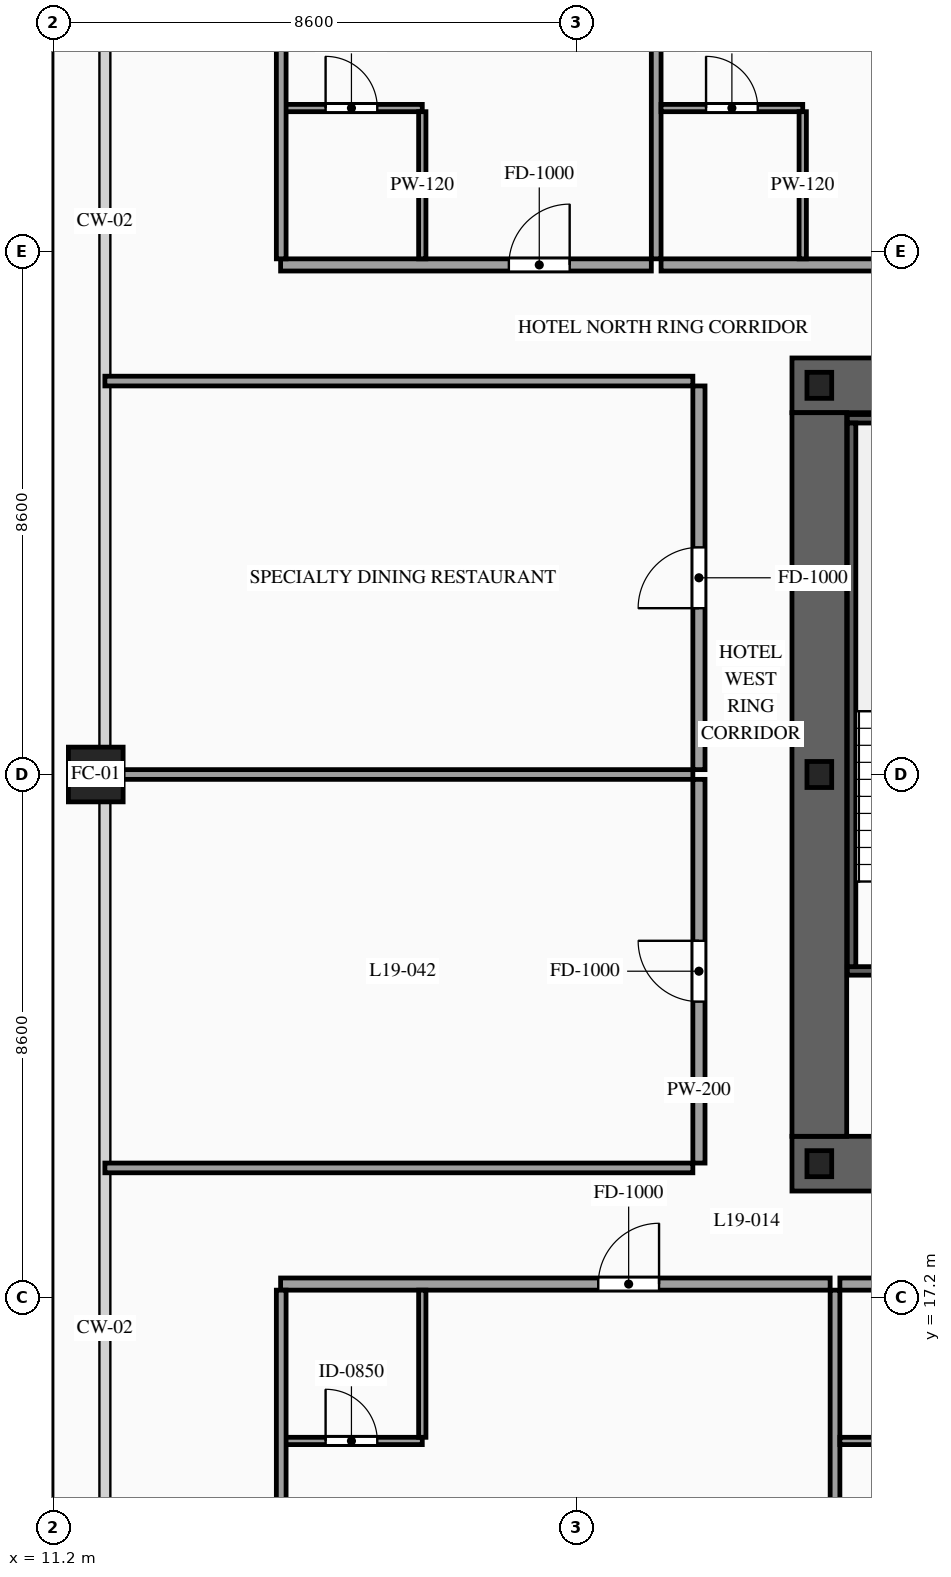
"""IFC4 building model, lengths in metres.
Left out: names, types, materials, properties, quantities, classifications, styles, units other than length and angle.
Written with IfcOpenShell. Run it as: python <this file> out.ifc"""

import sys

from ifc_helpers import new_model, si_unit, direction, frame, frame_2d, origin, origin_2d, place, context, subcontext, project, spatial, rectangle, hollow_rectangle, i_section, extrude, source, transform, mapped, element, fill, save


model = new_model("IFC4")
c1 = context("Model", 3, precision=1e-05, world=origin(), true_north=direction((0.0, 1.0)))
c2 = subcontext(c1, "Body", "Model", "MODEL_VIEW")
j1 = project(units=[si_unit("LENGTHUNIT", "METRE"), si_unit("PLANEANGLEUNIT", "RADIAN")], contexts=[c1])
p1 = place(None, origin())
s1 = spatial("IfcSite", under=j1, at=p1, CompositionType="ELEMENT")
p2 = place(p1, origin())
s2 = spatial("IfcBuilding", under=s1, at=p2, CompositionType="ELEMENT")
p3 = place(p2, frame((0.0, 0.0, 74.8)))
s3 = spatial("IfcBuildingStorey", under=s2, at=p3, CompositionType="ELEMENT", Elevation=74.8)
p4 = place(p3, frame((23.35, 19.4, 0.0), z_axis=(0.0, 0.0, 1.0), x_axis=(1.0, 0.0, 0.0)))
e1 = element("IfcWall", 1, at=p4, inside=s3, PredefinedType="SHEAR", context=c2, shape_type="SweptSolid", body=[
    extrude(rectangle(XDim=27.3, YDim=0.9, at=frame_2d((13.65, 0.0))), origin(), (0.0, 0.0, 1.0), 3.6),
])
p5 = place(p4, frame((2.1, 0.0, 0.0)))
e2 = element("IfcOpeningElement", 2, at=p5, cuts=e1, PredefinedType="OPENING", context=c2, shape_type="SweptSolid", body=[
    extrude(rectangle(XDim=1.1, YDim=2.2, at=frame_2d((0.55, 1.1))), frame((0.0, 0.465, 0.0), z_axis=(0.0, -1.0, 0.0), x_axis=(1.0, 0.0, 0.0)), (0.0, 0.0, 1.0), 0.93),
])
p6 = place(p4, frame((10.0, 0.0, 0.0)))
e3 = element("IfcOpeningElement", 3, at=p6, cuts=e1, PredefinedType="OPENING", context=c2, shape_type="SweptSolid", body=[
    extrude(rectangle(XDim=1.1, YDim=2.2, at=frame_2d((0.55, 1.1))), frame((0.0, 0.465, 0.0), z_axis=(0.0, -1.0, 0.0), x_axis=(1.0, 0.0, 0.0)), (0.0, 0.0, 1.0), 0.93),
])
p7 = place(p4, frame((23.2, 0.0, 0.0)))
e4 = element("IfcOpeningElement", 4, at=p7, cuts=e1, PredefinedType="OPENING", context=c2, shape_type="SweptSolid", body=[
    extrude(rectangle(XDim=1.1, YDim=2.2, at=frame_2d((0.55, 1.1))), frame((0.0, 0.465, 0.0), z_axis=(0.0, -1.0, 0.0), x_axis=(1.0, 0.0, 0.0)), (0.0, 0.0, 1.0), 0.93),
])
p8 = place(p4, frame((19.82, 0.0, 0.0)))
e5 = element("IfcOpeningElement", 5, at=p8, cuts=e1, PredefinedType="OPENING", context=c2, shape_type="SweptSolid", body=[
    extrude(rectangle(XDim=0.9, YDim=2.15, at=frame_2d((0.45, 1.075))), frame((0.0, 0.465, 0.0), z_axis=(0.0, -1.0, 0.0), x_axis=(1.0, 0.0, 0.0)), (0.0, 0.0, 1.0), 0.93),
])
p9 = place(p4, frame((18.38, 0.0, 0.0)))
e6 = element("IfcOpeningElement", 6, at=p9, cuts=e1, PredefinedType="OPENING", context=c2, shape_type="SweptSolid", body=[
    extrude(rectangle(XDim=0.9, YDim=2.15, at=frame_2d((0.45, 1.075))), frame((0.0, 0.465, 0.0), z_axis=(0.0, -1.0, 0.0), x_axis=(1.0, 0.0, 0.0)), (0.0, 0.0, 1.0), 0.93),
])
p10 = place(p3, frame((23.35, 32.2, 0.0), z_axis=(0.0, 0.0, 1.0), x_axis=(1.0, 0.0, 0.0)))
e7 = element("IfcWall", 7, at=p10, inside=s3, PredefinedType="SHEAR", context=c2, shape_type="SweptSolid", body=[
    extrude(rectangle(XDim=27.3, YDim=0.9, at=frame_2d((13.65, 0.0))), origin(), (0.0, 0.0, 1.0), 3.6),
])
p11 = place(p10, frame((4.72, 0.0, 0.0)))
e8 = element("IfcOpeningElement", 8, at=p11, cuts=e7, PredefinedType="OPENING", context=c2, shape_type="SweptSolid", body=[
    extrude(rectangle(XDim=0.9, YDim=2.15, at=frame_2d((0.45, 1.075))), frame((0.0, 0.465, 0.0), z_axis=(0.0, -1.0, 0.0), x_axis=(1.0, 0.0, 0.0)), (0.0, 0.0, 1.0), 0.93),
])
p12 = place(p10, frame((10.0, 0.0, 0.0)))
e9 = element("IfcOpeningElement", 9, at=p12, cuts=e7, PredefinedType="OPENING", context=c2, shape_type="SweptSolid", body=[
    extrude(rectangle(XDim=1.1, YDim=2.2, at=frame_2d((0.55, 1.1))), frame((0.0, 0.465, 0.0), z_axis=(0.0, -1.0, 0.0), x_axis=(1.0, 0.0, 0.0)), (0.0, 0.0, 1.0), 0.93),
])
p13 = place(p10, frame((15.85, 0.0, 0.0)))
e10 = element("IfcOpeningElement", 10, at=p13, cuts=e7, PredefinedType="OPENING", context=c2, shape_type="SweptSolid", body=[
    extrude(rectangle(XDim=1.1, YDim=2.2, at=frame_2d((0.55, 1.1))), frame((0.0, 0.465, 0.0), z_axis=(0.0, -1.0, 0.0), x_axis=(1.0, 0.0, 0.0)), (0.0, 0.0, 1.0), 0.93),
])
p14 = place(p10, frame((18.38, 0.0, 0.0)))
e11 = element("IfcOpeningElement", 11, at=p14, cuts=e7, PredefinedType="OPENING", context=c2, shape_type="SweptSolid", body=[
    extrude(rectangle(XDim=0.9, YDim=2.15, at=frame_2d((0.45, 1.075))), frame((0.0, 0.465, 0.0), z_axis=(0.0, -1.0, 0.0), x_axis=(1.0, 0.0, 0.0)), (0.0, 0.0, 1.0), 0.93),
])
p15 = place(p10, frame((19.82, 0.0, 0.0)))
e12 = element("IfcOpeningElement", 12, at=p15, cuts=e7, PredefinedType="OPENING", context=c2, shape_type="SweptSolid", body=[
    extrude(rectangle(XDim=0.9, YDim=2.15, at=frame_2d((0.45, 1.075))), frame((0.0, 0.465, 0.0), z_axis=(0.0, -1.0, 0.0), x_axis=(1.0, 0.0, 0.0)), (0.0, 0.0, 1.0), 0.93),
])
m1 = source(origin(), c2, "Body", "SweptSolid", [
    extrude(rectangle(XDim=11.9, YDim=0.9, at=frame_2d((5.95, 0.0))), origin(), (0.0, 0.0, 1.0), 3.6),
])
p16 = place(p3, frame((23.8, 19.85, 0.0), z_axis=(0.0, 0.0, 1.0), x_axis=(0.0, 1.0, 0.0)))
e13 = element("IfcWall", 13, at=p16, inside=s3, PredefinedType="SHEAR", context=c2, shape_type="MappedRepresentation", body=[
    mapped(m1, transform((0.0, 0.0, 0.0), scale=1.0)),
])
m2 = source(origin(), c2, "Body", "SweptSolid", [
    extrude(i_section(OverallWidth=0.407, OverallDepth=0.428, WebThickness=0.02, FlangeThickness=0.035, at=origin_2d()), origin(), (0.0, 0.0, 1.0), 3.6),
])
for number, where, z_axis, x_axis in (
    (14, (23.8, 19.4, 0.0), (0.0, 0.0, 1.0), (1.0, 0.0, 0.0)),
    (15, (23.8, 25.8, 0.0), (0.0, 0.0, 1.0), (1.0, 0.0, 0.0)),
    (16, (23.8, 32.2, 0.0), (0.0, 0.0, 1.0), (1.0, 0.0, 0.0)),
):
    element("IfcColumn", number, at=place(p3, frame(where, z_axis=z_axis, x_axis=x_axis)), inside=s3, PredefinedType="COLUMN", context=c2, shape_type="MappedRepresentation", body=[
        mapped(m2, transform((0.0, 0.0, 0.0), scale=1.0)),
    ])
m3 = source(origin(), c2, "Body", "SweptSolid", [
    extrude(hollow_rectangle(XDim=0.9, YDim=0.9, WallThickness=0.042, at=origin_2d()), origin(), (0.0, 0.0, 1.0), 3.6),
])
p17 = place(p3, frame((11.9, 25.8, 0.0), z_axis=(0.0, 0.0, 1.0), x_axis=(1.0, 0.0, 0.0)))
e17 = element("IfcColumn", 17, at=p17, inside=s3, PredefinedType="COLUMN", context=c2, shape_type="MappedRepresentation", body=[
    mapped(m3, transform((0.0, 0.0, 0.0), scale=1.0)),
])
p18 = place(p3, frame((24.26, 22.57, 0.0), z_axis=(0.0, 0.0, 1.0), x_axis=(1.0, 0.0, 0.0)))
e18 = element("IfcWall", 18, at=p18, inside=s3, PredefinedType="SOLIDWALL", context=c2, shape_type="SweptSolid", body=[
    extrude(rectangle(XDim=3.28, YDim=0.14, at=frame_2d((1.64, 0.0))), origin(), (0.0, 0.0, 1.0), 3.38),
])
p19 = place(p18, frame((1.09, 0.0, 0.0)))
e19 = element("IfcOpeningElement", 19, at=p19, cuts=e18, PredefinedType="OPENING", context=c2, shape_type="SweptSolid", body=[
    extrude(rectangle(XDim=1.1, YDim=2.2, at=frame_2d((0.55, 1.1))), frame((0.0, 0.085, 0.0), z_axis=(0.0, -1.0, 0.0), x_axis=(1.0, 0.0, 0.0)), (0.0, 0.0, 1.0), 0.17),
])
m4 = source(origin(), c2, "Body", "SweptSolid", [
    extrude(rectangle(XDim=3.28, YDim=0.14, at=frame_2d((1.64, 0.0))), origin(), (0.0, 0.0, 1.0), 3.38),
])
p20 = place(p3, frame((24.26, 31.65, 0.0), z_axis=(0.0, 0.0, 1.0), x_axis=(1.0, 0.0, 0.0)))
e20 = element("IfcWall", 20, at=p20, inside=s3, PredefinedType="SOLIDWALL", context=c2, shape_type="MappedRepresentation", body=[
    mapped(m4, transform((0.0, 0.0, 0.0), scale=1.0)),
])
m5 = source(origin(), c2, "Body", "SweptSolid", [
    extrude(rectangle(XDim=8.94, YDim=0.14, at=frame_2d((4.47, 0.0))), origin(), (0.0, 0.0, 1.0), 3.38),
])
p21 = place(p3, frame((24.33, 22.64, 0.0), z_axis=(0.0, 0.0, 1.0), x_axis=(0.0, 1.0, 0.0)))
e21 = element("IfcWall", 21, at=p21, inside=s3, PredefinedType="SOLIDWALL", context=c2, shape_type="MappedRepresentation", body=[
    mapped(m5, transform((0.0, 0.0, 0.0), scale=1.0)),
])
p22 = place(p3, frame((14.94, 17.42, 0.0), z_axis=(0.0, 0.0, 1.0), x_axis=(1.0, 0.0, 0.0)))
e22 = element("IfcWall", 22, at=p22, inside=s3, PredefinedType="PARTITIONING", context=c2, shape_type="SweptSolid", body=[
    extrude(rectangle(XDim=9.038, YDim=0.2, at=frame_2d((4.519, 0.0))), origin(), (0.0, 0.0, 1.0), 3.38),
])
p23 = place(p22, frame((5.224, 0.0, 0.0)))
e23 = element("IfcOpeningElement", 23, at=p23, cuts=e22, PredefinedType="OPENING", context=c2, shape_type="SweptSolid", body=[
    extrude(rectangle(XDim=1.0, YDim=2.2, at=frame_2d((0.5, 1.1))), frame((0.0, 0.115, 0.0), z_axis=(0.0, -1.0, 0.0), x_axis=(1.0, 0.0, 0.0)), (0.0, 0.0, 1.0), 0.23),
])
m6 = source(origin(), c2, "Body", "SweptSolid", [
    extrude(rectangle(XDim=16.47, YDim=0.16, at=frame_2d((8.235, 0.0))), origin(), (0.0, 0.0, 1.0), 3.38),
])
p24 = place(p3, frame((24.058, 0.85, 0.0), z_axis=(0.0, 0.0, 1.0), x_axis=(0.0, 1.0, 0.0)))
e24 = element("IfcWall", 24, at=p24, inside=s3, PredefinedType="PARTITIONING", context=c2, shape_type="MappedRepresentation", body=[
    mapped(m6, transform((0.0, 0.0, 0.0), scale=1.0)),
])
p25 = place(p3, frame((14.94, 14.84, 0.0), z_axis=(0.0, 0.0, 1.0), x_axis=(1.0, 0.0, 0.0)))
e25 = element("IfcWall", 25, at=p25, inside=s3, PredefinedType="PARTITIONING", context=c2, shape_type="SweptSolid", body=[
    extrude(rectangle(XDim=2.33, YDim=0.12, at=frame_2d((1.165, 0.0))), origin(), (0.0, 0.0, 1.0), 3.38),
])
p26 = place(p25, frame((0.74, 0.0, 0.0)))
e26 = element("IfcOpeningElement", 26, at=p26, cuts=e25, PredefinedType="OPENING", context=c2, shape_type="SweptSolid", body=[
    extrude(rectangle(XDim=0.85, YDim=2.1, at=frame_2d((0.425, 1.05))), frame((0.0, 0.075, 0.0), z_axis=(0.0, -1.0, 0.0), x_axis=(1.0, 0.0, 0.0)), (0.0, 0.0, 1.0), 0.15),
])
m7 = source(origin(), c2, "Body", "SweptSolid", [
    extrude(rectangle(XDim=2.42, YDim=0.12, at=frame_2d((1.21, 0.0))), origin(), (0.0, 0.0, 1.0), 3.38),
])
p27 = place(p3, frame((17.27, 14.9, 0.0), z_axis=(0.0, 0.0, 1.0), x_axis=(0.0, 1.0, 0.0)))
e27 = element("IfcWall", 27, at=p27, inside=s3, PredefinedType="PARTITIONING", context=c2, shape_type="MappedRepresentation", body=[
    mapped(m7, transform((0.0, 0.0, 0.0), scale=1.0)),
])
p28 = place(p3, frame((24.138, 17.42, 0.0), z_axis=(0.0, 0.0, 1.0), x_axis=(1.0, 0.0, 0.0)))
e28 = element("IfcWall", 28, at=p28, inside=s3, PredefinedType="PARTITIONING", context=c2, shape_type="SweptSolid", body=[
    extrude(rectangle(XDim=4.37, YDim=0.2, at=frame_2d((2.185, 0.0))), origin(), (0.0, 0.0, 1.0), 3.38),
])
p29 = place(p28, frame((2.875, 0.0, 0.0)))
e29 = element("IfcOpeningElement", 29, at=p29, cuts=e28, PredefinedType="OPENING", context=c2, shape_type="SweptSolid", body=[
    extrude(rectangle(XDim=1.0, YDim=2.2, at=frame_2d((0.5, 1.1))), frame((0.0, 0.115, 0.0), z_axis=(0.0, -1.0, 0.0), x_axis=(1.0, 0.0, 0.0)), (0.0, 0.0, 1.0), 0.23),
])
p30 = place(p3, frame((24.138, 14.84, 0.0), z_axis=(0.0, 0.0, 1.0), x_axis=(1.0, 0.0, 0.0)))
e30 = element("IfcWall", 30, at=p30, inside=s3, PredefinedType="PARTITIONING", context=c2, shape_type="SweptSolid", body=[
    extrude(rectangle(XDim=2.3, YDim=0.12, at=frame_2d((1.15, 0.0))), origin(), (0.0, 0.0, 1.0), 3.38),
])
p31 = place(p30, frame((0.725, 0.0, 0.0)))
e31 = element("IfcOpeningElement", 31, at=p31, cuts=e30, PredefinedType="OPENING", context=c2, shape_type="SweptSolid", body=[
    extrude(rectangle(XDim=0.85, YDim=2.1, at=frame_2d((0.425, 1.05))), frame((0.0, 0.075, 0.0), z_axis=(0.0, -1.0, 0.0), x_axis=(1.0, 0.0, 0.0)), (0.0, 0.0, 1.0), 0.15),
])
m8 = source(origin(), c2, "Body", "SweptSolid", [
    extrude(rectangle(XDim=16.32, YDim=0.16, at=frame_2d((8.16, 0.0))), origin(), (0.0, 0.0, 1.0), 3.38),
])
p32 = place(p3, frame((14.95, 1.0, 0.0), z_axis=(0.0, 0.0, 1.0), x_axis=(0.0, 1.0, 0.0)))
e32 = element("IfcWall", 32, at=p32, inside=s3, PredefinedType="PARTITIONING", context=c2, shape_type="MappedRepresentation", body=[
    mapped(m8, transform((0.0, 0.0, 0.0), scale=1.0)),
])
p33 = place(p3, frame((14.94, 34.18, 0.0), z_axis=(0.0, 0.0, 1.0), x_axis=(1.0, 0.0, 0.0)))
e33 = element("IfcWall", 33, at=p33, inside=s3, PredefinedType="PARTITIONING", context=c2, shape_type="SweptSolid", body=[
    extrude(rectangle(XDim=6.097, YDim=0.2, at=frame_2d((3.049, 0.0))), origin(), (0.0, 0.0, 1.0), 3.38),
])
p34 = place(p33, frame((3.754, 0.0, 0.0)))
e34 = element("IfcOpeningElement", 34, at=p34, cuts=e33, PredefinedType="OPENING", context=c2, shape_type="SweptSolid", body=[
    extrude(rectangle(XDim=1.0, YDim=2.2, at=frame_2d((0.5, 1.1))), frame((0.0, 0.115, 0.0), z_axis=(0.0, -1.0, 0.0), x_axis=(1.0, 0.0, 0.0)), (0.0, 0.0, 1.0), 0.23),
])
p35 = place(p3, frame((21.117, 34.28, 0.0), z_axis=(0.0, 0.0, 1.0), x_axis=(0.0, 1.0, 0.0)))
e35 = element("IfcWall", 35, at=p35, inside=s3, PredefinedType="PARTITIONING", context=c2, shape_type="MappedRepresentation", body=[
    mapped(m6, transform((0.0, 0.0, 0.0), scale=1.0)),
])
p36 = place(p3, frame((14.94, 36.76, 0.0), z_axis=(0.0, 0.0, 1.0), x_axis=(1.0, 0.0, 0.0)))
e36 = element("IfcWall", 36, at=p36, inside=s3, PredefinedType="PARTITIONING", context=c2, shape_type="SweptSolid", body=[
    extrude(rectangle(XDim=2.33, YDim=0.12, at=frame_2d((1.165, 0.0))), origin(), (0.0, 0.0, 1.0), 3.38),
])
p37 = place(p36, frame((0.74, 0.0, 0.0)))
e37 = element("IfcOpeningElement", 37, at=p37, cuts=e36, PredefinedType="OPENING", context=c2, shape_type="SweptSolid", body=[
    extrude(rectangle(XDim=0.85, YDim=2.1, at=frame_2d((0.425, 1.05))), frame((0.0, 0.075, 0.0), z_axis=(0.0, -1.0, 0.0), x_axis=(1.0, 0.0, 0.0)), (0.0, 0.0, 1.0), 0.15),
])
m9 = source(origin(), c2, "Body", "SweptSolid", [
    extrude(rectangle(XDim=2.42, YDim=0.12, at=frame_2d((1.21, 0.0))), origin(), (0.0, 0.0, 1.0), 3.38),
])
p38 = place(p3, frame((17.27, 34.28, 0.0), z_axis=(0.0, 0.0, 1.0), x_axis=(0.0, 1.0, 0.0)))
e38 = element("IfcWall", 38, at=p38, inside=s3, PredefinedType="PARTITIONING", context=c2, shape_type="MappedRepresentation", body=[
    mapped(m9, transform((0.0, 0.0, 0.0), scale=1.0)),
])
p39 = place(p3, frame((21.197, 34.18, 0.0), z_axis=(0.0, 0.0, 1.0), x_axis=(1.0, 0.0, 0.0)))
e39 = element("IfcWall", 39, at=p39, inside=s3, PredefinedType="PARTITIONING", context=c2, shape_type="SweptSolid", body=[
    extrude(rectangle(XDim=9.429, YDim=0.2, at=frame_2d((4.714, 0.0))), origin(), (0.0, 0.0, 1.0), 3.38),
])
p40 = place(p39, frame((5.42, 0.0, 0.0)))
e40 = element("IfcOpeningElement", 40, at=p40, cuts=e39, PredefinedType="OPENING", context=c2, shape_type="SweptSolid", body=[
    extrude(rectangle(XDim=1.0, YDim=2.2, at=frame_2d((0.5, 1.1))), frame((0.0, 0.115, 0.0), z_axis=(0.0, -1.0, 0.0), x_axis=(1.0, 0.0, 0.0)), (0.0, 0.0, 1.0), 0.23),
])
p41 = place(p3, frame((21.197, 36.76, 0.0), z_axis=(0.0, 0.0, 1.0), x_axis=(1.0, 0.0, 0.0)))
e41 = element("IfcWall", 41, at=p41, inside=s3, PredefinedType="PARTITIONING", context=c2, shape_type="SweptSolid", body=[
    extrude(rectangle(XDim=2.33, YDim=0.12, at=frame_2d((1.165, 0.0))), origin(), (0.0, 0.0, 1.0), 3.38),
])
p42 = place(p41, frame((0.74, 0.0, 0.0)))
e42 = element("IfcOpeningElement", 42, at=p42, cuts=e41, PredefinedType="OPENING", context=c2, shape_type="SweptSolid", body=[
    extrude(rectangle(XDim=0.85, YDim=2.1, at=frame_2d((0.425, 1.05))), frame((0.0, 0.075, 0.0), z_axis=(0.0, -1.0, 0.0), x_axis=(1.0, 0.0, 0.0)), (0.0, 0.0, 1.0), 0.15),
])
p43 = place(p3, frame((23.527, 34.28, 0.0), z_axis=(0.0, 0.0, 1.0), x_axis=(0.0, 1.0, 0.0)))
e43 = element("IfcWall", 43, at=p43, inside=s3, PredefinedType="PARTITIONING", context=c2, shape_type="MappedRepresentation", body=[
    mapped(m9, transform((0.0, 0.0, 0.0), scale=1.0)),
])
p44 = place(p3, frame((14.95, 34.28, 0.0), z_axis=(0.0, 0.0, 1.0), x_axis=(0.0, 1.0, 0.0)))
e44 = element("IfcWall", 44, at=p44, inside=s3, PredefinedType="PARTITIONING", context=c2, shape_type="MappedRepresentation", body=[
    mapped(m8, transform((0.0, 0.0, 0.0), scale=1.0)),
])
p45 = place(p3, frame((21.82, 19.41, 0.0), z_axis=(0.0, 0.0, 1.0), x_axis=(0.0, 1.0, 0.0)))
e45 = element("IfcWall", 45, at=p45, inside=s3, PredefinedType="PARTITIONING", context=c2, shape_type="SweptSolid", body=[
    extrude(rectangle(XDim=6.31, YDim=0.2, at=frame_2d((3.155, 0.0))), origin(), (0.0, 0.0, 1.0), 3.38),
])
p46 = place(p45, frame((2.655, 0.0, 0.0)))
e46 = element("IfcOpeningElement", 46, at=p46, cuts=e45, PredefinedType="OPENING", context=c2, shape_type="SweptSolid", body=[
    extrude(rectangle(XDim=1.0, YDim=2.2, at=frame_2d((0.5, 1.1))), frame((0.0, 0.115, 0.0), z_axis=(0.0, -1.0, 0.0), x_axis=(1.0, 0.0, 0.0)), (0.0, 0.0, 1.0), 0.23),
])
m10 = source(origin(), c2, "Body", "SweptSolid", [
    extrude(rectangle(XDim=9.67, YDim=0.16, at=frame_2d((4.835, 0.0))), origin(), (0.0, 0.0, 1.0), 2.575),
])
p47 = place(p3, frame((12.05, 25.8, 0.0), z_axis=(0.0, 0.0, 1.0), x_axis=(1.0, 0.0, 0.0)))
e47 = element("IfcWall", 47, at=p47, inside=s3, PredefinedType="PARTITIONING", context=c2, shape_type="MappedRepresentation", body=[
    mapped(m10, transform((0.0, 0.0, 0.0), scale=1.0)),
])
m11 = source(origin(), c2, "Body", "SweptSolid", [
    extrude(rectangle(XDim=9.67, YDim=0.16, at=frame_2d((4.835, 0.0))), origin(), (0.0, 0.0, 1.0), 2.875),
])
p48 = place(p3, frame((12.05, 19.33, 0.0), z_axis=(0.0, 0.0, 1.0), x_axis=(1.0, 0.0, 0.0)))
e48 = element("IfcWall", 48, at=p48, inside=s3, PredefinedType="PARTITIONING", context=c2, shape_type="MappedRepresentation", body=[
    mapped(m11, transform((0.0, 0.0, 0.0), scale=1.0)),
])
p49 = place(p3, frame((21.82, 25.88, 0.0), z_axis=(0.0, 0.0, 1.0), x_axis=(0.0, 1.0, 0.0)))
e49 = element("IfcWall", 49, at=p49, inside=s3, PredefinedType="PARTITIONING", context=c2, shape_type="SweptSolid", body=[
    extrude(rectangle(XDim=6.31, YDim=0.2, at=frame_2d((3.155, 0.0))), origin(), (0.0, 0.0, 1.0), 3.38),
])
p50 = place(p49, frame((2.655, 0.0, 0.0)))
e50 = element("IfcOpeningElement", 50, at=p50, cuts=e49, PredefinedType="OPENING", context=c2, shape_type="SweptSolid", body=[
    extrude(rectangle(XDim=1.0, YDim=2.2, at=frame_2d((0.5, 1.1))), frame((0.0, 0.115, 0.0), z_axis=(0.0, -1.0, 0.0), x_axis=(1.0, 0.0, 0.0)), (0.0, 0.0, 1.0), 0.23),
])
p51 = place(p3, frame((12.05, 32.27, 0.0), z_axis=(0.0, 0.0, 1.0), x_axis=(1.0, 0.0, 0.0)))
e51 = element("IfcWall", 51, at=p51, inside=s3, PredefinedType="PARTITIONING", context=c2, shape_type="MappedRepresentation", body=[
    mapped(m11, transform((0.0, 0.0, 0.0), scale=1.0)),
])
m12 = source(origin(), c2, "Body", "SweptSolid", [
    extrude(rectangle(XDim=1.0, YDim=2.2, at=frame_2d((0.5, 1.1))), frame((0.0, 0.025, 0.0), z_axis=(0.0, -1.0, 0.0), x_axis=(1.0, 0.0, 0.0)), (0.0, 0.0, 1.0), 0.05),
])
p52 = place(p23, origin())
e52 = element("IfcDoor", 52, at=p52, inside=s3, OperationType="SINGLE_SWING_RIGHT", PredefinedType="DOOR", context=c2, shape_type="MappedRepresentation", body=[
    mapped(m12, transform((0.0, 0.0, 0.0), scale=1.0)),
])
fill(e23, e52)
m13 = source(origin(), c2, "Body", "SweptSolid", [
    extrude(rectangle(XDim=0.85, YDim=2.1, at=frame_2d((0.425, 1.05))), frame((0.0, 0.025, 0.0), z_axis=(0.0, -1.0, 0.0), x_axis=(1.0, 0.0, 0.0)), (0.0, 0.0, 1.0), 0.05),
])
p53 = place(p26, origin())
e53 = element("IfcDoor", 53, at=p53, inside=s3, OperationType="SINGLE_SWING_LEFT", PredefinedType="DOOR", context=c2, shape_type="MappedRepresentation", body=[
    mapped(m13, transform((0.0, 0.0, 0.0), scale=1.0)),
])
fill(e26, e53)
p54 = place(p34, origin())
e54 = element("IfcDoor", 54, at=p54, inside=s3, OperationType="SINGLE_SWING_RIGHT", PredefinedType="DOOR", context=c2, shape_type="MappedRepresentation", body=[
    mapped(m12, transform((0.0, 0.0, 0.0), scale=1.0)),
])
fill(e34, e54)
p55 = place(p37, origin())
e55 = element("IfcDoor", 55, at=p55, inside=s3, OperationType="SINGLE_SWING_LEFT", PredefinedType="DOOR", context=c2, shape_type="MappedRepresentation", body=[
    mapped(m13, transform((0.0, 0.0, 0.0), scale=1.0)),
])
fill(e37, e55)
p56 = place(p42, origin())
e56 = element("IfcDoor", 56, at=p56, inside=s3, OperationType="SINGLE_SWING_LEFT", PredefinedType="DOOR", context=c2, shape_type="MappedRepresentation", body=[
    mapped(m13, transform((0.0, 0.0, 0.0), scale=1.0)),
])
fill(e42, e56)
p57 = place(p46, origin())
e57 = element("IfcDoor", 57, at=p57, inside=s3, OperationType="SINGLE_SWING_RIGHT", PredefinedType="DOOR", context=c2, shape_type="MappedRepresentation", body=[
    mapped(m12, transform((0.0, 0.0, 0.0), scale=1.0)),
])
fill(e46, e57)
p58 = place(p50, origin())
e58 = element("IfcDoor", 58, at=p58, inside=s3, OperationType="SINGLE_SWING_LEFT", PredefinedType="DOOR", context=c2, shape_type="MappedRepresentation", body=[
    mapped(m12, transform((0.0, 0.0, 0.0), scale=1.0)),
])
fill(e50, e58)
save(model, sys.argv[1])
